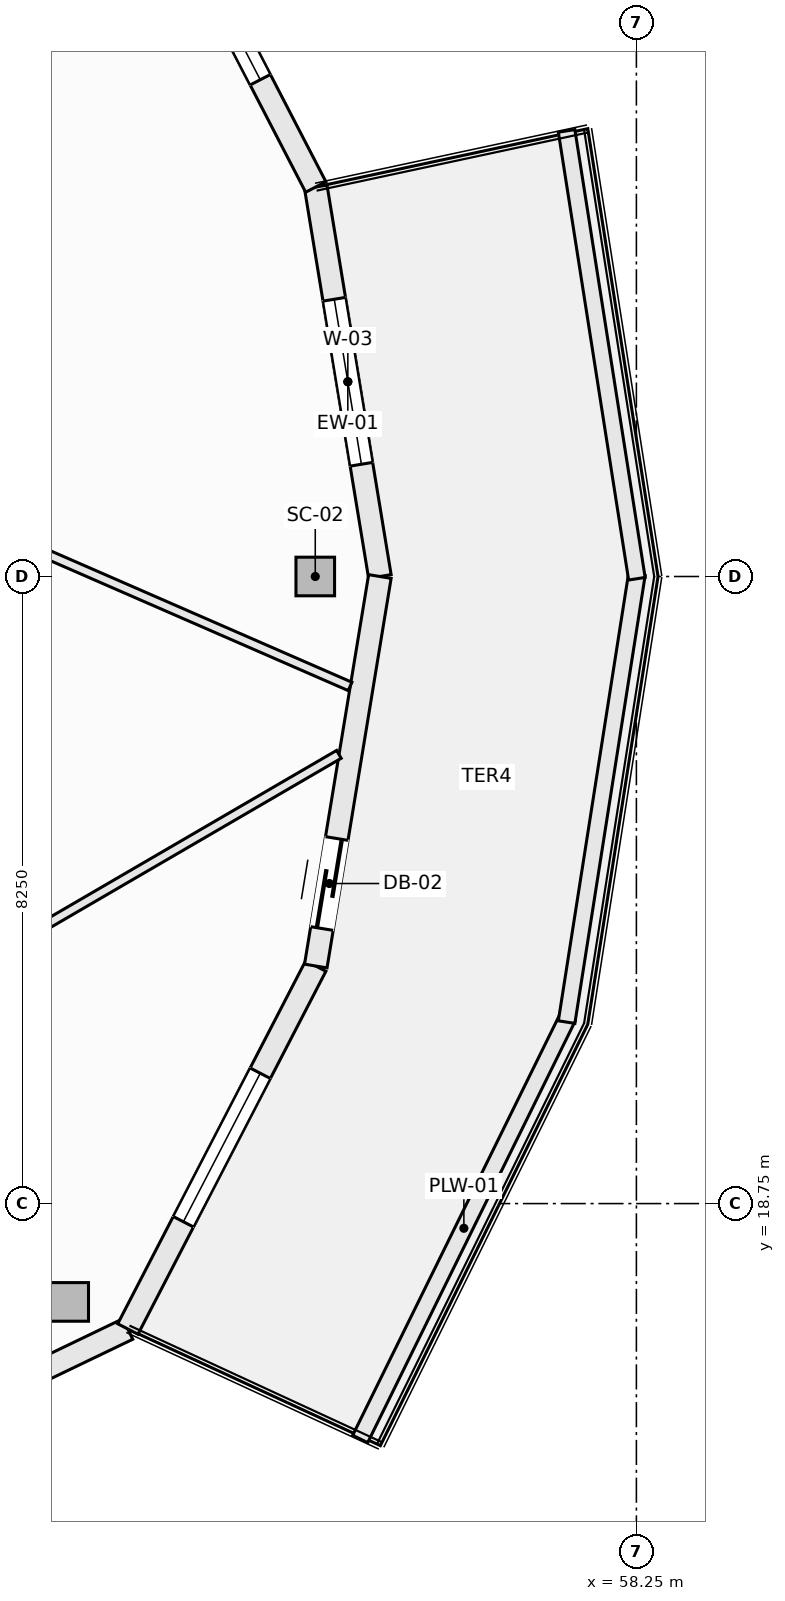
"""IFC4 building model, lengths in metres.
Left out: names, types, materials, properties, quantities, classifications, styles, units other than length and angle.
Written with IfcOpenShell. Run it as: python <this file> out.ifc"""

import sys

from ifc_helpers import new_model, si_unit, direction, frame, frame_2d, origin, origin_2d, place, context, subcontext, project, spatial, rectangle, hollow_rectangle, extrude, element, fill, save


model = new_model("IFC4")
c1 = context("Model", 3, precision=1e-05, world=origin(), true_north=direction((0.0, 1.0)))
c2 = subcontext(c1, "Body", "Model", "MODEL_VIEW")
j1 = project(units=[si_unit("LENGTHUNIT", "METRE"), si_unit("PLANEANGLEUNIT", "RADIAN")], contexts=[c1])
p1 = place(None, origin())
s1 = spatial("IfcSite", under=j1, at=p1, CompositionType="ELEMENT")
p2 = place(p1, origin())
s2 = spatial("IfcBuilding", under=s1, at=p2, CompositionType="ELEMENT")
p3 = place(p2, frame((0.0, 0.0, 229.4)))
s3 = spatial("IfcBuildingStorey", under=s2, at=p3, CompositionType="ELEMENT", Elevation=229.4)
for number, where, z_axis, x_axis in (
    (1, (54.025, 27.0, -0.27), (0.0, 0.0, 1.0), (1.0, 0.0, 0.0)),
    (2, (50.787, 17.456, -0.27), (0.0, 0.0, 1.0), (1.0, 0.0, 0.0)),
):
    element("IfcColumn", number, at=place(p3, frame(where, z_axis=z_axis, x_axis=x_axis)), inside=s3, PredefinedType="COLUMN", context=c2, shape_type="SweptSolid", body=[
        extrude(hollow_rectangle(XDim=0.508, YDim=0.508, WallThickness=0.019, at=origin_2d()), origin(), (0.0, 0.0, 1.0), 3.3),
    ])
p4 = place(p3, frame((54.032, 32.125, 0.0), z_axis=(0.0, 0.0, 1.0), x_axis=(0.16237087798, -0.986729799886, 0.0)))
e3 = element("IfcWall", 3, at=p4, inside=s3, PredefinedType="SOLIDWALL", context=c2, shape_type="SweptSolid", body=[
    extrude(rectangle(XDim=5.193, YDim=0.3, at=frame_2d((2.597, 0.0))), origin(), (0.0, 0.0, 1.0), 2.605),
])
p5 = place(p4, frame((1.497, 0.0, 0.72)))
e4 = element("IfcOpeningElement", 4, at=p5, cuts=e3, PredefinedType="OPENING", context=c2, shape_type="SweptSolid", body=[
    extrude(rectangle(XDim=2.2, YDim=1.65, at=frame_2d((1.1, 0.825))), frame((0.0, 0.16, 0.0), z_axis=(0.0, -1.0, 0.0), x_axis=(1.0, 0.0, 0.0)), (0.0, 0.0, 1.0), 0.32),
])
p6 = place(p3, frame((51.559, 36.9, 0.0), z_axis=(0.0, 0.0, 1.0), x_axis=(0.459808219482, -0.888018243786, 0.0)))
e5 = element("IfcWall", 5, at=p6, inside=s3, PredefinedType="SOLIDWALL", context=c2, shape_type="SweptSolid", body=[
    extrude(rectangle(XDim=5.378, YDim=0.3, at=frame_2d((2.689, 0.0))), origin(), (0.0, 0.0, 1.0), 2.605),
])
p7 = place(p6, frame((1.589, 0.0, 0.72)))
e6 = element("IfcOpeningElement", 6, at=p7, cuts=e5, PredefinedType="OPENING", context=c2, shape_type="SweptSolid", body=[
    extrude(rectangle(XDim=2.2, YDim=1.65, at=frame_2d((1.1, 0.825))), frame((0.0, 0.16, 0.0), z_axis=(0.0, -1.0, 0.0), x_axis=(1.0, 0.0, 0.0)), (0.0, 0.0, 1.0), 0.32),
])
p8 = place(p3, frame((46.133, 14.493, 0.0), z_axis=(0.0, 0.0, 1.0), x_axis=(0.901348331142, 0.433094892545, 0.0)))
e7 = element("IfcWall", 7, at=p8, inside=s3, PredefinedType="SOLIDWALL", context=c2, shape_type="SweptSolid", body=[
    extrude(rectangle(XDim=6.021, YDim=0.3, at=frame_2d((3.01, 0.0))), origin(), (0.0, 0.0, 1.0), 2.605),
])
p9 = place(p8, frame((1.91, 0.0, 0.72)))
e8 = element("IfcOpeningElement", 8, at=p9, cuts=e7, PredefinedType="OPENING", context=c2, shape_type="SweptSolid", body=[
    extrude(rectangle(XDim=2.2, YDim=1.65, at=frame_2d((1.1, 0.825))), frame((0.0, 0.16, 0.0), z_axis=(0.0, -1.0, 0.0), x_axis=(1.0, 0.0, 0.0)), (0.0, 0.0, 1.0), 0.32),
])
p10 = place(p3, frame((51.559, 17.1, 0.0), z_axis=(0.0, 0.0, 1.0), x_axis=(0.459808219482, 0.888018243786, 0.0)))
e9 = element("IfcWall", 9, at=p10, inside=s3, PredefinedType="SOLIDWALL", context=c2, shape_type="SweptSolid", body=[
    extrude(rectangle(XDim=5.378, YDim=0.3, at=frame_2d((2.689, 0.0))), origin(), (0.0, 0.0, 1.0), 2.605),
])
p11 = place(p10, frame((1.589, 0.0, 0.72)))
e10 = element("IfcOpeningElement", 10, at=p11, cuts=e9, PredefinedType="OPENING", context=c2, shape_type="SweptSolid", body=[
    extrude(rectangle(XDim=2.2, YDim=1.65, at=frame_2d((1.1, 0.825))), frame((0.0, 0.16, 0.0), z_axis=(0.0, -1.0, 0.0), x_axis=(1.0, 0.0, 0.0)), (0.0, 0.0, 1.0), 0.32),
])
p12 = place(p3, frame((54.032, 21.875, 0.0), z_axis=(0.0, 0.0, 1.0), x_axis=(0.16237087798, 0.986729799886, 0.0)))
e11 = element("IfcWall", 11, at=p12, inside=s3, PredefinedType="SOLIDWALL", context=c2, shape_type="SweptSolid", body=[
    extrude(rectangle(XDim=5.193, YDim=0.3, at=frame_2d((2.597, 0.0))), origin(), (0.0, 0.0, 1.0), 2.605),
])
p13 = place(p12, frame((0.5, 0.0, 0.0)))
e12 = element("IfcOpeningElement", 12, at=p13, cuts=e11, PredefinedType="OPENING", context=c2, shape_type="SweptSolid", body=[
    extrude(rectangle(XDim=1.2, YDim=2.2, at=frame_2d((0.6, 1.1))), frame((0.0, 0.16, 0.0), z_axis=(0.0, -1.0, 0.0), x_axis=(1.0, 0.0, 0.0)), (0.0, 0.0, 1.0), 0.32),
])
p14 = place(p3, frame((54.616, 15.653, 0.0), z_axis=(0.0, 0.0, 1.0), x_axis=(0.441640961804, 0.897191875162, 0.0)))
e13 = element("IfcWall", 13, at=p14, inside=s3, PredefinedType="PARAPET", context=c2, shape_type="SweptSolid", body=[
    extrude(rectangle(XDim=6.178, YDim=0.22, at=frame_2d((3.089, 0.0))), origin(), (0.0, 0.0, 1.0), 0.52),
])
for number, where, z_axis, x_axis in (
    (14, (57.332, 21.138, 0.0), (0.0, 0.0, 1.0), (0.155, 0.988, 0.0)),
    (15, (57.332, 32.862, 0.0), (0.0, 0.0, 1.0), (0.155, -0.988, 0.0)),
):
    element("IfcWall", number, at=place(p3, frame(where, z_axis=z_axis, x_axis=x_axis)), inside=s3, PredefinedType="PARAPET", context=c2, shape_type="SweptSolid", body=[
        extrude(rectangle(XDim=5.964, YDim=0.22, at=frame_2d((2.982, 0.0))), origin(), (0.0, 0.0, 1.0), 0.52),
    ])
p15 = place(p3, frame((43.773, 18.512, 0.0), z_axis=(0.0, 0.0, 1.0), x_axis=(0.864261022419, 0.503043621495, 0.0)))
e16 = element("IfcWall", 16, at=p15, inside=s3, PredefinedType="PARTITIONING", context=c2, shape_type="SweptSolid", body=[
    extrude(rectangle(XDim=12.222, YDim=0.12, at=frame_2d((6.111, 0.0))), origin(), (0.0, 0.0, 1.0), 3.03),
])
p16 = place(p3, frame((41.582, 31.18, 0.0), z_axis=(0.0, 0.0, 1.0), x_axis=(0.916624100851, -0.399750244202, 0.0)))
e17 = element("IfcWall", 17, at=p16, inside=s3, PredefinedType="PARTITIONING", context=c2, shape_type="SweptSolid", body=[
    extrude(rectangle(XDim=14.074, YDim=0.12, at=frame_2d((7.037, 0.0))), origin(), (0.0, 0.0, 1.0), 2.478),
])
p17 = place(p5, origin())
e18 = element("IfcWindow", 18, at=p17, inside=s3, PartitioningType="SINGLE_PANEL", PredefinedType="WINDOW", context=c2, shape_type="SweptSolid", body=[
    extrude(rectangle(XDim=2.2, YDim=1.65, at=frame_2d((1.1, 0.825))), frame((0.0, 0.03, 0.0), z_axis=(0.0, -1.0, 0.0), x_axis=(1.0, 0.0, 0.0)), (0.0, 0.0, 1.0), 0.06),
])
fill(e4, e18)
p18 = place(p7, origin())
e19 = element("IfcWindow", 19, at=p18, inside=s3, PartitioningType="SINGLE_PANEL", PredefinedType="WINDOW", context=c2, shape_type="SweptSolid", body=[
    extrude(rectangle(XDim=2.2, YDim=1.65, at=frame_2d((1.1, 0.825))), frame((0.0, 0.03, 0.0), z_axis=(0.0, -1.0, 0.0), x_axis=(1.0, 0.0, 0.0)), (0.0, 0.0, 1.0), 0.06),
])
fill(e6, e19)
p19 = place(p11, origin())
e20 = element("IfcWindow", 20, at=p19, inside=s3, PartitioningType="SINGLE_PANEL", PredefinedType="WINDOW", context=c2, shape_type="SweptSolid", body=[
    extrude(rectangle(XDim=2.2, YDim=1.65, at=frame_2d((1.1, 0.825))), frame((0.0, 0.03, 0.0), z_axis=(0.0, -1.0, 0.0), x_axis=(1.0, 0.0, 0.0)), (0.0, 0.0, 1.0), 0.06),
])
fill(e10, e20)
p20 = place(p13, frame((1.2, 0.0, 0.0), z_axis=(0.0, 0.0, 1.0), x_axis=(-1.0, 0.0, 0.0)))
e21 = element("IfcDoor", 21, at=p20, inside=s3, OperationType="SLIDING_TO_LEFT", PredefinedType="DOOR", context=c2, shape_type="SweptSolid", body=[
    extrude(rectangle(XDim=1.2, YDim=2.2, at=frame_2d((0.6, 1.1))), frame((0.0, 0.025, 0.0), z_axis=(0.0, -1.0, 0.0), x_axis=(1.0, 0.0, 0.0)), (0.0, 0.0, 1.0), 0.05),
])
fill(e12, e21)
save(model, sys.argv[1])
